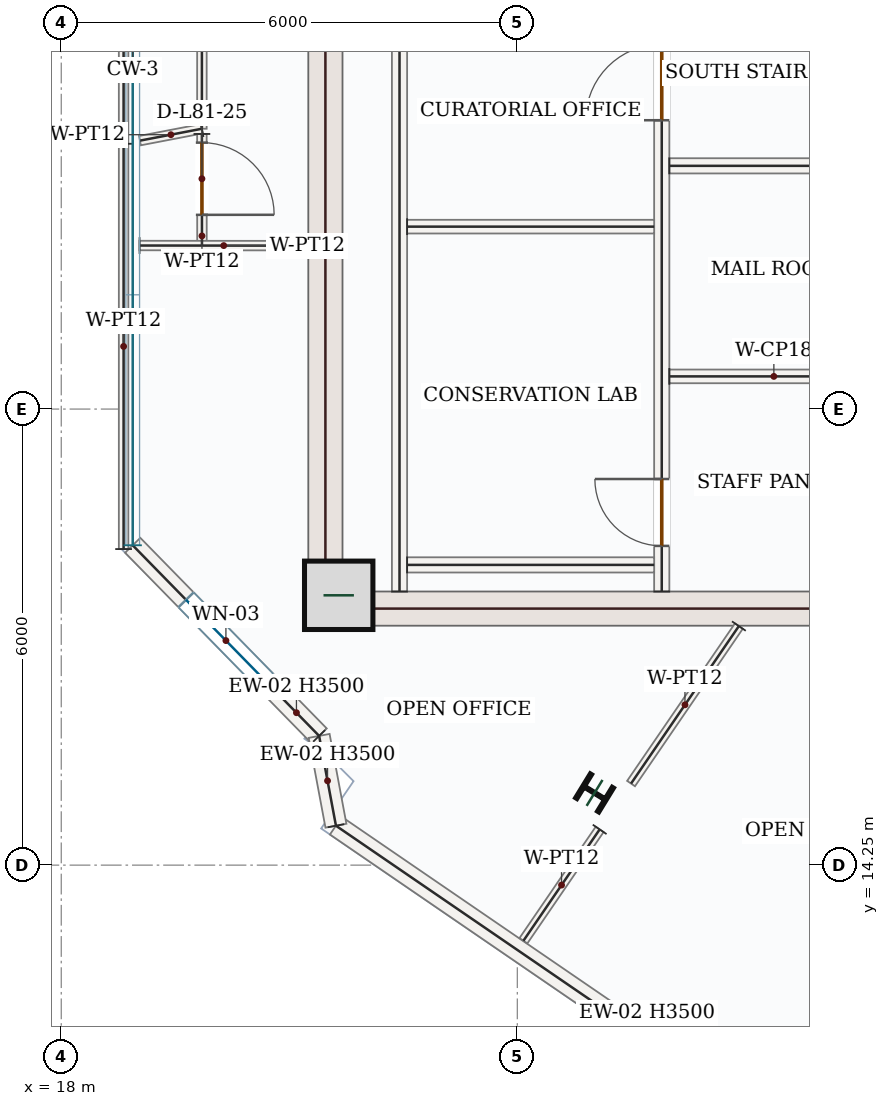
"""IFC4 building model, lengths in metres.
Left out: names, types, materials, properties, quantities, classifications, styles, units other than length and angle.
Written with IfcOpenShell. Run it as: python <this file> out.ifc"""

import sys

from ifc_helpers import new_model, si_unit, direction, frame, frame_2d, origin, origin_2d, place, context, subcontext, project, spatial, rectangle, i_section, extrude, source, transform, mapped, element, fill, save


model = new_model("IFC4")
c1 = context("Model", 3, precision=1e-05, world=origin(), true_north=direction((0.0, 1.0)))
c2 = subcontext(c1, "Body", "Model", "MODEL_VIEW")
j1 = project(units=[si_unit("LENGTHUNIT", "METRE"), si_unit("PLANEANGLEUNIT", "RADIAN")], contexts=[c1])
p1 = place(None, origin())
s1 = spatial("IfcSite", under=j1, at=p1, CompositionType="ELEMENT")
p2 = place(p1, origin())
s2 = spatial("IfcBuilding", under=s1, at=p2, CompositionType="ELEMENT")
p3 = place(p2, frame((0.0, 0.0, 334.8)))
s3 = spatial("IfcBuildingStorey", under=s2, at=p3, CompositionType="ELEMENT", Elevation=334.8)
m1 = source(origin(), c2, "Body", "SweptSolid", [
    extrude(rectangle(XDim=8.55, YDim=0.45, at=frame_2d((4.275, 0.0))), origin(), (0.0, 0.0, 1.0), 3.5),
])
p4 = place(p3, frame((21.475, 17.4, 0.0), z_axis=(0.0, 0.0, 1.0), x_axis=(0.0, 1.0, 0.0)))
e1 = element("IfcWall", 1, at=p4, inside=s3, PredefinedType="SHEAR", context=c2, shape_type="MappedRepresentation", body=[
    mapped(m1, transform((0.0, 0.0, 0.0), x_axis=(1.0, 0.0, 0.0), y_axis=(0.0, 1.0, 0.0), z_axis=(0.0, 0.0, 1.0), scale=1.0)),
])
m2 = source(origin(), c2, "Body", "SweptSolid", [
    extrude(rectangle(XDim=7.1, YDim=0.45, at=frame_2d((3.55, 0.0))), origin(), (0.0, 0.0, 1.0), 3.5),
])
p5 = place(p3, frame((21.7, 17.625, 0.0), z_axis=(0.0, 0.0, 1.0), x_axis=(1.0, 0.0, 0.0)))
e2 = element("IfcWall", 2, at=p5, inside=s3, PredefinedType="SHEAR", context=c2, shape_type="MappedRepresentation", body=[
    mapped(m2, transform((0.0, 0.0, 0.0), x_axis=(1.0, 0.0, 0.0), y_axis=(0.0, 1.0, 0.0), z_axis=(0.0, 0.0, 1.0), scale=1.0)),
])
m3 = source(origin(), c2, "Body", "SweptSolid", [
    extrude(rectangle(XDim=0.9, YDim=0.9, at=origin_2d()), origin(), (0.0, 0.0, 1.0), 3.75),
])
p6 = place(p3, frame((21.65, 17.8, 0.0), z_axis=(0.0, 0.0, 1.0), x_axis=(1.0, 0.0, 0.0)))
e3 = element("IfcColumn", 3, at=p6, inside=s3, PredefinedType="COLUMN", context=c2, shape_type="MappedRepresentation", body=[
    mapped(m3, transform((0.0, 0.0, 0.0), x_axis=(1.0, 0.0, 0.0), y_axis=(0.0, 1.0, 0.0), z_axis=(0.0, 0.0, 1.0), scale=1.0)),
])
m4 = source(origin(), c2, "Body", "SweptSolid", [
    extrude(i_section(OverallWidth=0.369, OverallDepth=0.356, WebThickness=0.011, FlangeThickness=0.018, FilletRadius=0.018, at=origin_2d()), origin(), (0.0, 0.0, 1.0), 3.75),
])
p7 = place(p3, frame((25.016, 15.2, 0.0), z_axis=(0.0, 0.0, 1.0), x_axis=(0.522498564716, 0.852640164354, 0.0)))
e4 = element("IfcColumn", 4, at=p7, inside=s3, PredefinedType="COLUMN", context=c2, shape_type="MappedRepresentation", body=[
    mapped(m4, transform((0.0, 0.0, 0.0), x_axis=(1.0, 0.0, 0.0), y_axis=(0.0, 1.0, 0.0), z_axis=(0.0, 0.0, 1.0), scale=1.0)),
])
p8 = place(p3, frame((21.393, 15.95, 0.0), z_axis=(0.0, 0.0, 1.0), x_axis=(-0.699198279454, 0.714927804753, 0.0)))
e5 = element("IfcWall", 5, at=p8, inside=s3, PredefinedType="SOLIDWALL", context=c2, shape_type="SweptSolid", body=[
    extrude(rectangle(XDim=3.508, YDim=0.28, at=frame_2d((1.754, 0.0))), origin(), (0.0, 0.0, 1.0), 3.5),
])
p9 = place(p8, frame((1.004, 0.0, 0.85)))
e6 = element("IfcOpeningElement", 6, at=p9, cuts=e5, PredefinedType="OPENING", context=c2, shape_type="SweptSolid", body=[
    extrude(rectangle(XDim=1.5, YDim=1.5, at=frame_2d((0.75, 0.75))), frame((0.0, 0.15, 0.0), z_axis=(0.0, -1.0, 0.0), x_axis=(1.0, 0.0, 0.0)), (0.0, 0.0, 1.0), 0.3),
])
m5 = source(origin(), c2, "Body", "SweptSolid", [
    extrude(rectangle(XDim=9.92, YDim=0.28, at=frame_2d((4.96, 0.0))), origin(), (0.0, 0.0, 1.0), 3.5),
])
p10 = place(p3, frame((29.799, 9.164, 0.0), z_axis=(0.0, 0.0, 1.0), x_axis=(-0.825121888295, 0.56495474992, 0.0)))
e7 = element("IfcWall", 7, at=p10, inside=s3, PredefinedType="SOLIDWALL", context=c2, shape_type="MappedRepresentation", body=[
    mapped(m5, transform((0.0, 0.0, 0.0), x_axis=(1.0, 0.0, 0.0), y_axis=(0.0, 1.0, 0.0), z_axis=(0.0, 0.0, 1.0), scale=1.0)),
])
m6 = source(origin(), c2, "Body", "SweptSolid", [
    extrude(rectangle(XDim=1.202, YDim=0.28, at=frame_2d((0.601, 0.0))), origin(), (0.0, 0.0, 1.0), 3.5),
])
p11 = place(p3, frame((21.614, 14.769, 0.0), z_axis=(0.0, 0.0, 1.0), x_axis=(-0.183994246351, 0.982927320462, 0.0)))
e8 = element("IfcWall", 8, at=p11, inside=s3, PredefinedType="SOLIDWALL", context=c2, shape_type="MappedRepresentation", body=[
    mapped(m6, transform((0.0, 0.0, 0.0), x_axis=(1.0, 0.0, 0.0), y_axis=(0.0, 1.0, 0.0), z_axis=(0.0, 0.0, 1.0), scale=1.0)),
])
m7 = source(origin(), c2, "Body", "SweptSolid", [
    extrude(rectangle(XDim=7.87, YDim=0.2, at=frame_2d((3.935, 0.0))), origin(), (0.0, 0.0, 1.0), 3.5),
])
p12 = place(p3, frame((22.45, 17.85, 0.0), z_axis=(0.0, 0.0, 1.0), x_axis=(0.0, 1.0, 0.0)))
e9 = element("IfcWall", 9, at=p12, inside=s3, PredefinedType="SOLIDWALL", context=c2, shape_type="MappedRepresentation", body=[
    mapped(m7, transform((0.0, 0.0, 0.0), x_axis=(1.0, 0.0, 0.0), y_axis=(0.0, 1.0, 0.0), z_axis=(0.0, 0.0, 1.0), scale=1.0)),
])
p13 = place(p3, frame((25.9, 17.85, 0.0), z_axis=(0.0, 0.0, 1.0), x_axis=(0.0, 1.0, 0.0)))
e10 = element("IfcWall", 10, at=p13, inside=s3, PredefinedType="SOLIDWALL", context=c2, shape_type="SweptSolid", body=[
    extrude(rectangle(XDim=8.0, YDim=0.2, at=frame_2d((4.0, 0.0))), origin(), (0.0, 0.0, 1.0), 3.5),
])
p14 = place(p13, frame((6.2, 0.0, 0.0)))
e11 = element("IfcOpeningElement", 11, at=p14, cuts=e10, PredefinedType="OPENING", context=c2, shape_type="SweptSolid", body=[
    extrude(rectangle(XDim=1.0, YDim=2.15, at=frame_2d((0.5, 1.075))), frame((0.0, 0.11, 0.0), z_axis=(0.0, -1.0, 0.0), x_axis=(1.0, 0.0, 0.0)), (0.0, 0.0, 1.0), 0.22),
])
p15 = place(p13, frame((0.6, 0.0, 0.0)))
e12 = element("IfcOpeningElement", 12, at=p15, cuts=e10, PredefinedType="OPENING", context=c2, shape_type="SweptSolid", body=[
    extrude(rectangle(XDim=0.88, YDim=2.1, at=frame_2d((0.44, 1.05))), frame((0.0, 0.11, 0.0), z_axis=(0.0, -1.0, 0.0), x_axis=(1.0, 0.0, 0.0)), (0.0, 0.0, 1.0), 0.22),
])
m8 = source(origin(), c2, "Body", "SweptSolid", [
    extrude(rectangle(XDim=3.25, YDim=0.2, at=frame_2d((1.625, 0.0))), origin(), (0.0, 0.0, 1.0), 3.5),
])
p16 = place(p3, frame((22.55, 18.2, 0.0), z_axis=(0.0, 0.0, 1.0), x_axis=(1.0, 0.0, 0.0)))
e13 = element("IfcWall", 13, at=p16, inside=s3, PredefinedType="SOLIDWALL", context=c2, shape_type="MappedRepresentation", body=[
    mapped(m8, transform((0.0, 0.0, 0.0), x_axis=(1.0, 0.0, 0.0), y_axis=(0.0, 1.0, 0.0), z_axis=(0.0, 0.0, 1.0), scale=1.0)),
])
m9 = source(origin(), c2, "Body", "SweptSolid", [
    extrude(rectangle(XDim=3.25, YDim=0.18, at=frame_2d((1.625, 0.0))), origin(), (0.0, 0.0, 1.0), 3.5),
])
p17 = place(p3, frame((22.55, 22.65, 0.0), z_axis=(0.0, 0.0, 1.0), x_axis=(1.0, 0.0, 0.0)))
e14 = element("IfcWall", 14, at=p17, inside=s3, PredefinedType="PARTITIONING", context=c2, shape_type="MappedRepresentation", body=[
    mapped(m9, transform((0.0, 0.0, 0.0), x_axis=(1.0, 0.0, 0.0), y_axis=(0.0, 1.0, 0.0), z_axis=(0.0, 0.0, 1.0), scale=1.0)),
])
m10 = source(origin(), c2, "Body", "SweptSolid", [
    extrude(rectangle(XDim=2.75, YDim=0.2, at=frame_2d((1.375, 0.0))), origin(), (0.0, 0.0, 1.0), 3.5),
])
p18 = place(p3, frame((26.0, 23.45, 0.0), z_axis=(0.0, 0.0, 1.0), x_axis=(1.0, 0.0, 0.0)))
e15 = element("IfcWall", 15, at=p18, inside=s3, PredefinedType="SOLIDWALL", context=c2, shape_type="MappedRepresentation", body=[
    mapped(m10, transform((0.0, 0.0, 0.0), x_axis=(1.0, 0.0, 0.0), y_axis=(0.0, 1.0, 0.0), z_axis=(0.0, 0.0, 1.0), scale=1.0)),
])
m11 = source(origin(), c2, "Body", "SweptSolid", [
    extrude(rectangle(XDim=2.75, YDim=0.18, at=frame_2d((1.375, 0.0))), origin(), (0.0, 0.0, 1.0), 3.5),
])
p19 = place(p3, frame((26.0, 20.68, 0.0), z_axis=(0.0, 0.0, 1.0), x_axis=(1.0, 0.0, 0.0)))
e16 = element("IfcWall", 16, at=p19, inside=s3, PredefinedType="PARTITIONING", context=c2, shape_type="MappedRepresentation", body=[
    mapped(m11, transform((0.0, 0.0, 0.0), x_axis=(1.0, 0.0, 0.0), y_axis=(0.0, 1.0, 0.0), z_axis=(0.0, 0.0, 1.0), scale=1.0)),
])
p20 = place(p3, frame((19.853, 31.53, 0.0), z_axis=(0.0, 0.0, 1.0), x_axis=(-0.000321574412, -0.999999948295, 0.0)))
e17 = element("IfcWall", 17, at=p20, inside=s3, PredefinedType="PARTITIONING", context=c2, shape_type="SweptSolid", body=[
    extrude(rectangle(XDim=7.592, YDim=0.125, at=frame_2d((3.796, 0.0))), origin(), (0.0, 0.0, 1.0), 3.5),
])
p21 = place(p20, frame((5.181, 0.0, 0.0)))
e18 = element("IfcOpeningElement", 18, at=p21, cuts=e17, PredefinedType="OPENING", context=c2, shape_type="SweptSolid", body=[
    extrude(rectangle(XDim=0.95, YDim=2.15, at=frame_2d((0.475, 1.075))), frame((0.0, 0.073, 0.0), z_axis=(0.0, -1.0, 0.0), x_axis=(1.0, 0.0, 0.0)), (0.0, 0.0, 1.0), 0.145),
])
m12 = source(origin(), c2, "Body", "SweptSolid", [
    extrude(rectangle(XDim=0.83, YDim=0.125, at=frame_2d((0.415, 0.0))), origin(), (0.0, 0.0, 1.0), 3.5),
])
p22 = place(p3, frame((19.85, 23.938, 0.0), z_axis=(0.0, 0.0, 1.0), x_axis=(-0.98205677528, -0.188585498189, 0.0)))
e19 = element("IfcWall", 19, at=p22, inside=s3, PredefinedType="PARTITIONING", context=c2, shape_type="MappedRepresentation", body=[
    mapped(m12, transform((0.0, 0.0, 0.0), x_axis=(1.0, 0.0, 0.0), y_axis=(0.0, 1.0, 0.0), z_axis=(0.0, 0.0, 1.0), scale=1.0)),
])
m13 = source(origin(), c2, "Body", "SweptSolid", [
    extrude(rectangle(XDim=6.795, YDim=0.125, at=frame_2d((3.397, 0.0))), origin(), (0.0, 0.0, 1.0), 3.5),
])
p23 = place(p3, frame((18.82, 23.74, 0.0), z_axis=(0.0, 0.0, 1.0), x_axis=(-7.1862312e-05, 0.999999997418, 0.0)))
e20 = element("IfcWall", 20, at=p23, inside=s3, PredefinedType="PARTITIONING", context=c2, shape_type="MappedRepresentation", body=[
    mapped(m13, transform((0.0, 0.0, 0.0), x_axis=(1.0, 0.0, 0.0), y_axis=(0.0, 1.0, 0.0), z_axis=(0.0, 0.0, 1.0), scale=1.0)),
])
p24 = place(p3, frame((19.85, 23.869, 0.0), z_axis=(0.0, 0.0, 1.0), x_axis=(0.000665004009, -0.999999778885, 0.0)))
e21 = element("IfcWall", 21, at=p24, inside=s3, PredefinedType="PARTITIONING", context=c2, shape_type="SweptSolid", body=[
    extrude(rectangle(XDim=1.469, YDim=0.125, at=frame_2d((0.734, 0.0))), origin(), (0.0, 0.0, 1.0), 3.5),
])
p25 = place(p24, frame((0.114, 0.0, 0.0)))
e22 = element("IfcOpeningElement", 22, at=p25, cuts=e21, PredefinedType="OPENING", context=c2, shape_type="SweptSolid", body=[
    extrude(rectangle(XDim=0.95, YDim=2.15, at=frame_2d((0.475, 1.075))), frame((0.0, 0.073, 0.0), z_axis=(0.0, -1.0, 0.0), x_axis=(1.0, 0.0, 0.0)), (0.0, 0.0, 1.0), 0.145),
])
m14 = source(origin(), c2, "Body", "SweptSolid", [
    extrude(rectangle(XDim=2.215, YDim=0.125, at=frame_2d((1.107, 0.0))), origin(), (0.0, 0.0, 1.0), 3.5),
])
p26 = place(p3, frame((19.03, 22.402, 0.0), z_axis=(0.0, 0.0, 1.0), x_axis=(0.999999702379, -0.000771519665, 0.0)))
e23 = element("IfcWall", 23, at=p26, inside=s3, PredefinedType="PARTITIONING", context=c2, shape_type="MappedRepresentation", body=[
    mapped(m14, transform((0.0, 0.0, 0.0), x_axis=(1.0, 0.0, 0.0), y_axis=(0.0, 1.0, 0.0), z_axis=(0.0, 0.0, 1.0), scale=1.0)),
])
m15 = source(origin(), c2, "Body", "SweptSolid", [
    extrude(rectangle(XDim=2.511, YDim=0.125, at=frame_2d((1.255, 0.0))), origin(), (0.0, 0.0, 1.0), 3.5),
])
p27 = place(p3, frame((26.915, 17.395, 0.0), z_axis=(0.0, 0.0, 1.0), x_axis=(-0.564980194272, -0.825104466162, 0.0)))
e24 = element("IfcWall", 24, at=p27, inside=s3, PredefinedType="PARTITIONING", context=c2, shape_type="MappedRepresentation", body=[
    mapped(m15, transform((0.0, 0.0, 0.0), x_axis=(1.0, 0.0, 0.0), y_axis=(0.0, 1.0, 0.0), z_axis=(0.0, 0.0, 1.0), scale=1.0)),
])
m16 = source(origin(), c2, "Body", "SweptSolid", [
    extrude(rectangle(XDim=1.775, YDim=0.125, at=frame_2d((0.888, 0.0))), origin(), (0.0, 0.0, 1.0), 3.5),
])
p28 = place(p3, frame((25.083, 14.72, 0.0), z_axis=(0.0, 0.0, 1.0), x_axis=(-0.56509798207, -0.825023800057, 0.0)))
e25 = element("IfcWall", 25, at=p28, inside=s3, PredefinedType="PARTITIONING", context=c2, shape_type="MappedRepresentation", body=[
    mapped(m16, transform((0.0, 0.0, 0.0), x_axis=(1.0, 0.0, 0.0), y_axis=(0.0, 1.0, 0.0), z_axis=(0.0, 0.0, 1.0), scale=1.0)),
])
m17 = source(origin(), c2, "Body", "SweptSolid", [
    extrude(rectangle(XDim=5.332, YDim=0.125, at=frame_2d((2.666, 0.0))), origin(), (0.0, 0.0, 1.0), 3.5),
])
p29 = place(p3, frame((18.82, 18.408, 0.0), z_axis=(0.0, 0.0, 1.0), x_axis=(0.0, 1.0, 0.0)))
e26 = element("IfcWall", 26, at=p29, inside=s3, PredefinedType="PARTITIONING", context=c2, shape_type="MappedRepresentation", body=[
    mapped(m17, transform((0.0, 0.0, 0.0), x_axis=(1.0, 0.0, 0.0), y_axis=(0.0, 1.0, 0.0), z_axis=(0.0, 0.0, 1.0), scale=1.0)),
])
m18 = source(origin(), c2, "Body", "SweptSolid", [
    extrude(rectangle(XDim=1.5, YDim=1.5, at=frame_2d((0.75, 0.75))), frame((0.0, 0.03, 0.0), z_axis=(0.0, -1.0, 0.0), x_axis=(1.0, 0.0, 0.0)), (0.0, 0.0, 1.0), 0.06),
])
p30 = place(p9, origin())
e27 = element("IfcWindow", 27, at=p30, inside=s3, PartitioningType="SINGLE_PANEL", PredefinedType="WINDOW", context=c2, shape_type="MappedRepresentation", body=[
    mapped(m18, transform((0.0, 0.0, 0.0), x_axis=(1.0, 0.0, 0.0), y_axis=(0.0, 1.0, 0.0), z_axis=(0.0, 0.0, 1.0), scale=1.0)),
])
fill(e6, e27)
m19 = source(origin(), c2, "Body", "SweptSolid", [
    extrude(rectangle(XDim=1.0, YDim=2.15, at=frame_2d((0.5, 1.075))), frame((0.0, 0.025, 0.0), z_axis=(0.0, -1.0, 0.0), x_axis=(1.0, 0.0, 0.0)), (0.0, 0.0, 1.0), 0.05),
])
p31 = place(p14, origin())
e28 = element("IfcDoor", 28, at=p31, inside=s3, OperationType="SINGLE_SWING_LEFT", PredefinedType="DOOR", context=c2, shape_type="MappedRepresentation", body=[
    mapped(m19, transform((0.0, 0.0, 0.0), x_axis=(1.0, 0.0, 0.0), y_axis=(0.0, 1.0, 0.0), z_axis=(0.0, 0.0, 1.0), scale=1.0)),
])
fill(e11, e28)
m20 = source(origin(), c2, "Body", "SweptSolid", [
    extrude(rectangle(XDim=0.88, YDim=2.1, at=frame_2d((0.44, 1.05))), frame((0.0, 0.025, 0.0), z_axis=(0.0, -1.0, 0.0), x_axis=(1.0, 0.0, 0.0)), (0.0, 0.0, 1.0), 0.05),
])
p32 = place(p15, origin())
e29 = element("IfcDoor", 29, at=p32, inside=s3, OperationType="SINGLE_SWING_RIGHT", PredefinedType="DOOR", context=c2, shape_type="MappedRepresentation", body=[
    mapped(m20, transform((0.0, 0.0, 0.0), x_axis=(1.0, 0.0, 0.0), y_axis=(0.0, 1.0, 0.0), z_axis=(0.0, 0.0, 1.0), scale=1.0)),
])
fill(e12, e29)
m21 = source(origin(), c2, "Body", "SweptSolid", [
    extrude(rectangle(XDim=0.95, YDim=2.15, at=frame_2d((0.475, 1.075))), frame((0.0, 0.025, 0.0), z_axis=(0.0, -1.0, 0.0), x_axis=(1.0, 0.0, 0.0)), (0.0, 0.0, 1.0), 0.05),
])
p33 = place(p25, origin())
e30 = element("IfcDoor", 30, at=p33, inside=s3, OperationType="SINGLE_SWING_RIGHT", PredefinedType="DOOR", context=c2, shape_type="MappedRepresentation", body=[
    mapped(m21, transform((0.0, 0.0, 0.0), x_axis=(1.0, 0.0, 0.0), y_axis=(0.0, 1.0, 0.0), z_axis=(0.0, 0.0, 1.0), scale=1.0)),
])
fill(e22, e30)
save(model, sys.argv[1])
